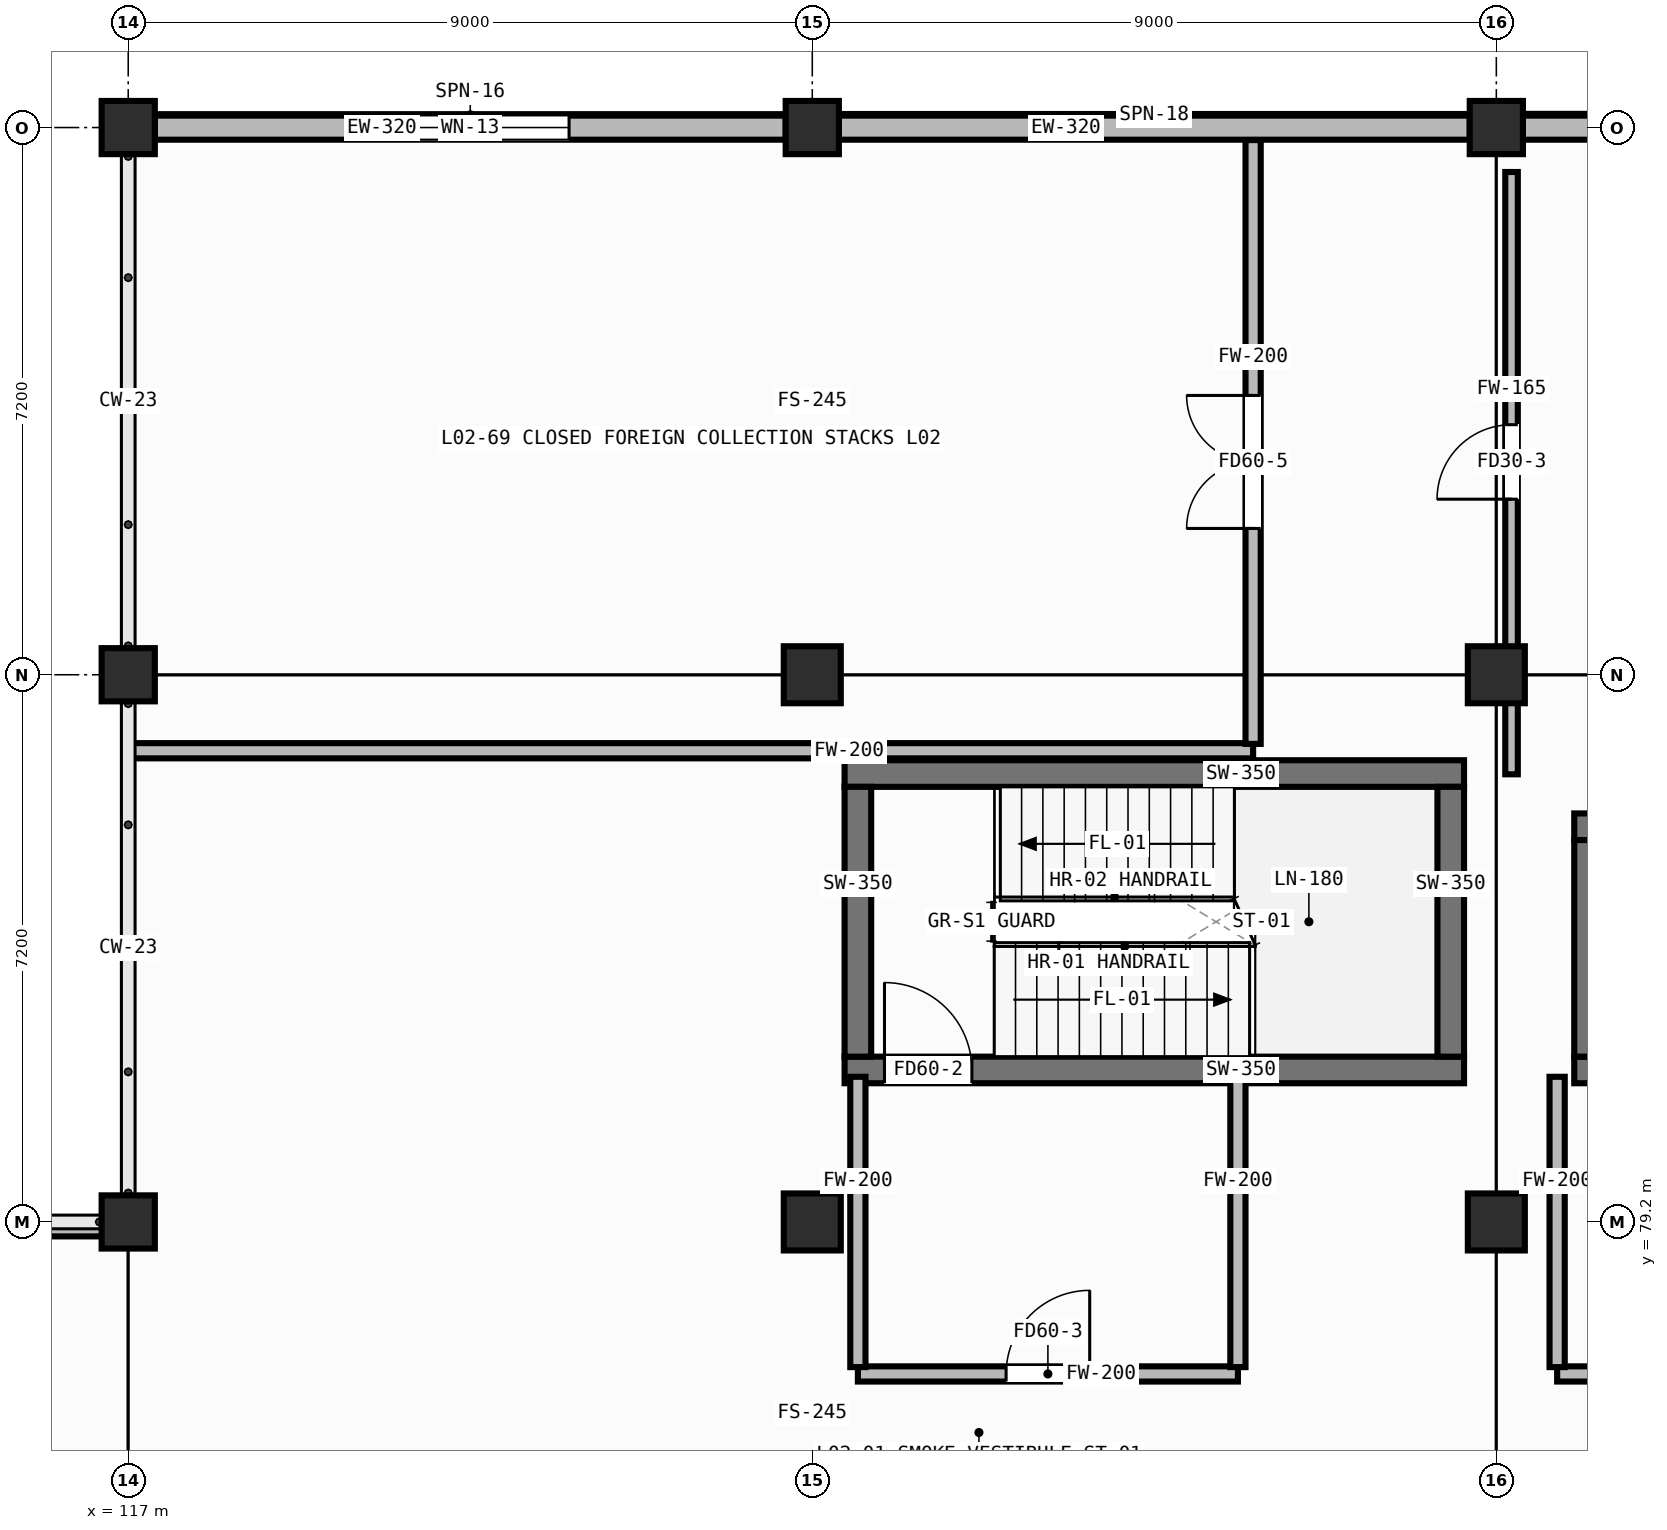
"""IFC4 building model, lengths in metres.
Left out: names, types, materials, properties, quantities, classifications, styles, units other than length and angle.
Written with IfcOpenShell. Run it as: python <this file> out.ifc"""

import sys

from ifc_helpers import new_model, si_unit, direction, frame, frame_2d, origin, origin_2d, place, context, subcontext, project, spatial, rectangle, hollow_rectangle, extrude, element, fill, save


model = new_model("IFC4")
c1 = context("Model", 3, precision=1e-05, world=origin(), true_north=direction((0.0, 1.0)))
c2 = subcontext(c1, "Body", "Model", "MODEL_VIEW")
j1 = project(units=[si_unit("LENGTHUNIT", "METRE"), si_unit("PLANEANGLEUNIT", "RADIAN")], contexts=[c1])
p1 = place(None, origin())
s1 = spatial("IfcSite", under=j1, at=p1, CompositionType="ELEMENT")
p2 = place(p1, origin())
s2 = spatial("IfcBuilding", under=s1, at=p2, CompositionType="ELEMENT")
p3 = place(p2, frame((0.0, 0.0, 4.8)))
s3 = spatial("IfcBuildingStorey", under=s2, at=p3, CompositionType="ELEMENT", Elevation=4.8)
for number, where, z_axis, x_axis in (
    (1, (117.0, 79.2, 0.0), (0.0, 0.0, 1.0), (1.0, 0.0, 0.0)),
    (2, (117.0, 86.4, 0.0), (0.0, 0.0, 1.0), (1.0, 0.0, 0.0)),
    (3, (117.0, 93.6, 0.0), (0.0, 0.0, 1.0), (1.0, 0.0, 0.0)),
):
    element("IfcColumn", number, at=place(p3, frame(where, z_axis=z_axis, x_axis=x_axis)), inside=s3, PredefinedType="COLUMN", context=c2, shape_type="SweptSolid", body=[
        extrude(hollow_rectangle(XDim=0.7, YDim=0.7, WallThickness=0.028, at=origin_2d()), origin(), (0.0, 0.0, 1.0), 4.0),
    ])
for number, where, z_axis, x_axis in (
    (4, (126.0, 79.2, 0.0), (0.0, 0.0, 1.0), (1.0, 0.0, 0.0)),
    (5, (126.0, 86.4, 0.0), (0.0, 0.0, 1.0), (1.0, 0.0, 0.0)),
):
    element("IfcColumn", number, at=place(p3, frame(where, z_axis=z_axis, x_axis=x_axis)), inside=s3, PredefinedType="COLUMN", context=c2, shape_type="SweptSolid", body=[
        extrude(hollow_rectangle(XDim=0.75, YDim=0.75, WallThickness=0.032, at=origin_2d()), origin(), (0.0, 0.0, 1.0), 4.0),
    ])
p4 = place(p3, frame((126.0, 93.6, 0.0), z_axis=(0.0, 0.0, 1.0), x_axis=(1.0, 0.0, 0.0)))
e6 = element("IfcColumn", 6, at=p4, inside=s3, PredefinedType="COLUMN", context=c2, shape_type="SweptSolid", body=[
    extrude(hollow_rectangle(XDim=0.7, YDim=0.7, WallThickness=0.028, at=origin_2d()), origin(), (0.0, 0.0, 1.0), 4.0),
])
for number, where, z_axis, x_axis in (
    (7, (135.0, 79.2, 0.0), (0.0, 0.0, 1.0), (1.0, 0.0, 0.0)),
    (8, (135.0, 86.4, 0.0), (0.0, 0.0, 1.0), (1.0, 0.0, 0.0)),
):
    element("IfcColumn", number, at=place(p3, frame(where, z_axis=z_axis, x_axis=x_axis)), inside=s3, PredefinedType="COLUMN", context=c2, shape_type="SweptSolid", body=[
        extrude(hollow_rectangle(XDim=0.75, YDim=0.75, WallThickness=0.032, at=origin_2d()), origin(), (0.0, 0.0, 1.0), 4.0),
    ])
p5 = place(p3, frame((135.0, 93.6, 0.0), z_axis=(0.0, 0.0, 1.0), x_axis=(1.0, 0.0, 0.0)))
e9 = element("IfcColumn", 9, at=p5, inside=s3, PredefinedType="COLUMN", context=c2, shape_type="SweptSolid", body=[
    extrude(hollow_rectangle(XDim=0.7, YDim=0.7, WallThickness=0.028, at=origin_2d()), origin(), (0.0, 0.0, 1.0), 4.0),
])
p6 = place(p3, frame((125.65, 93.6, 0.0), z_axis=(0.0, 0.0, 1.0), x_axis=(-1.0, 0.0, 0.0)))
e10 = element("IfcWall", 10, at=p6, inside=s3, PredefinedType="STANDARD", context=c2, shape_type="SweptSolid", body=[
    extrude(rectangle(XDim=8.3, YDim=0.32, at=frame_2d((4.15, 0.0))), origin(), (0.0, 0.0, 1.0), 3.255),
])
p7 = place(p6, frame((2.85, 0.0, 0.85)))
e11 = element("IfcOpeningElement", 11, at=p7, cuts=e10, PredefinedType="OPENING", context=c2, shape_type="SweptSolid", body=[
    extrude(rectangle(XDim=2.6, YDim=1.6, at=frame_2d((1.3, 0.8))), frame((0.0, 0.172, 0.0), z_axis=(0.0, -1.0, 0.0), x_axis=(1.0, 0.0, 0.0)), (0.0, 0.0, 1.0), 0.344),
])
p8 = place(p3, frame((134.65, 93.6, 0.0), z_axis=(0.0, 0.0, 1.0), x_axis=(-1.0, 0.0, 0.0)))
e12 = element("IfcWall", 12, at=p8, inside=s3, PredefinedType="STANDARD", context=c2, shape_type="SweptSolid", body=[
    extrude(rectangle(XDim=8.3, YDim=0.32, at=frame_2d((4.15, 0.0))), origin(), (0.0, 0.0, 1.0), 3.255),
])
p9 = place(p3, frame((143.65, 93.6, 0.0), z_axis=(0.0, 0.0, 1.0), x_axis=(-1.0, 0.0, 0.0)))
e13 = element("IfcWall", 13, at=p9, inside=s3, PredefinedType="STANDARD", context=c2, shape_type="SweptSolid", body=[
    extrude(rectangle(XDim=8.3, YDim=0.32, at=frame_2d((4.15, 0.0))), origin(), (0.0, 0.0, 1.0), 3.255),
])
p10 = place(p9, frame((2.85, 0.0, 0.85)))
e14 = element("IfcOpeningElement", 14, at=p10, cuts=e13, PredefinedType="OPENING", context=c2, shape_type="SweptSolid", body=[
    extrude(rectangle(XDim=2.6, YDim=1.6, at=frame_2d((1.3, 0.8))), frame((0.0, 0.172, 0.0), z_axis=(0.0, -1.0, 0.0), x_axis=(1.0, 0.0, 0.0)), (0.0, 0.0, 1.0), 0.344),
])
p11 = place(p3, frame((108.0, 79.105, 4.0), z_axis=(0.0, 0.0, 1.0), x_axis=(1.0, 0.0, 0.0)))
e15 = element("IfcWall", 15, at=p11, inside=s3, PredefinedType="PARAPET", context=c2, shape_type="SweptSolid", body=[
    extrude(rectangle(XDim=9.0, YDim=0.19, at=frame_2d((4.5, 0.0))), origin(), (0.0, 0.0, 1.0), 0.65),
])
p12 = place(p3, frame((126.425, 81.2, 0.0), z_axis=(0.0, 0.0, 1.0), x_axis=(1.0, 0.0, 0.0)))
e16 = element("IfcWall", 16, at=p12, inside=s3, PredefinedType="SHEAR", context=c2, shape_type="SweptSolid", body=[
    extrude(rectangle(XDim=8.15, YDim=0.35, at=frame_2d((4.075, 0.0))), origin(), (0.0, 0.0, 1.0), 3.755),
])
p13 = place(p12, frame((0.525, 0.0, 0.0)))
e17 = element("IfcOpeningElement", 17, at=p13, cuts=e16, PredefinedType="OPENING", context=c2, shape_type="SweptSolid", body=[
    extrude(rectangle(XDim=1.15, YDim=2.1, at=frame_2d((0.575, 1.05))), frame((0.0, 0.187, 0.0), z_axis=(0.0, -1.0, 0.0), x_axis=(1.0, 0.0, 0.0)), (0.0, 0.0, 1.0), 0.374),
])
p14 = place(p3, frame((126.425, 85.1, 0.0), z_axis=(0.0, 0.0, 1.0), x_axis=(1.0, 0.0, 0.0)))
e18 = element("IfcWall", 18, at=p14, inside=s3, PredefinedType="SHEAR", context=c2, shape_type="SweptSolid", body=[
    extrude(rectangle(XDim=8.15, YDim=0.35, at=frame_2d((4.075, 0.0))), origin(), (0.0, 0.0, 1.0), 3.755),
])
for number, where, z_axis, x_axis in (
    (19, (126.6, 81.375, 0.0), (0.0, 0.0, 1.0), (0.0, 1.0, 0.0)),
    (20, (134.4, 81.375, 0.0), (0.0, 0.0, 1.0), (0.0, 1.0, 0.0)),
):
    element("IfcWall", number, at=place(p3, frame(where, z_axis=z_axis, x_axis=x_axis)), inside=s3, PredefinedType="SHEAR", context=c2, shape_type="SweptSolid", body=[
        extrude(rectangle(XDim=3.55, YDim=0.35, at=frame_2d((1.775, 0.0))), origin(), (0.0, 0.0, 1.0), 3.755),
    ])
p15 = place(p3, frame((136.025, 81.2, 0.0), z_axis=(0.0, 0.0, 1.0), x_axis=(1.0, 0.0, 0.0)))
e21 = element("IfcWall", 21, at=p15, inside=s3, PredefinedType="SHEAR", context=c2, shape_type="SweptSolid", body=[
    extrude(rectangle(XDim=2.75, YDim=0.35, at=frame_2d((1.375, 0.0))), origin(), (0.0, 0.0, 1.0), 3.755),
])
p16 = place(p15, frame((0.8, 0.0, 0.0)))
e22 = element("IfcOpeningElement", 22, at=p16, cuts=e21, PredefinedType="OPENING", context=c2, shape_type="SweptSolid", body=[
    extrude(rectangle(XDim=1.15, YDim=2.12, at=frame_2d((0.575, 1.06))), frame((0.0, 0.187, 0.0), z_axis=(0.0, -1.0, 0.0), x_axis=(1.0, 0.0, 0.0)), (0.0, 0.0, 1.0), 0.374),
])
p17 = place(p3, frame((136.025, 84.4, 0.0), z_axis=(0.0, 0.0, 1.0), x_axis=(1.0, 0.0, 0.0)))
e23 = element("IfcWall", 23, at=p17, inside=s3, PredefinedType="SHEAR", context=c2, shape_type="SweptSolid", body=[
    extrude(rectangle(XDim=2.75, YDim=0.35, at=frame_2d((1.375, 0.0))), origin(), (0.0, 0.0, 1.0), 3.755),
])
p18 = place(p3, frame((136.2, 81.375, 0.0), z_axis=(0.0, 0.0, 1.0), x_axis=(0.0, 1.0, 0.0)))
e24 = element("IfcWall", 24, at=p18, inside=s3, PredefinedType="SHEAR", context=c2, shape_type="SweptSolid", body=[
    extrude(rectangle(XDim=2.85, YDim=0.35, at=frame_2d((1.425, 0.0))), origin(), (0.0, 0.0, 1.0), 3.755),
])
p19 = place(p3, frame((126.6, 77.2, 0.0), z_axis=(0.0, 0.0, 1.0), x_axis=(1.0, 0.0, 0.0)))
e25 = element("IfcWall", 25, at=p19, inside=s3, PredefinedType="PARTITIONING", context=c2, shape_type="SweptSolid", body=[
    extrude(rectangle(XDim=5.0, YDim=0.2, at=frame_2d((2.5, 0.0))), origin(), (0.0, 0.0, 1.0), 3.755),
])
p20 = place(p19, frame((1.95, 0.0, 0.0)))
e26 = element("IfcOpeningElement", 26, at=p20, cuts=e25, PredefinedType="OPENING", context=c2, shape_type="SweptSolid", body=[
    extrude(rectangle(XDim=1.1, YDim=2.08, at=frame_2d((0.55, 1.04))), frame((0.0, 0.112, 0.0), z_axis=(0.0, -1.0, 0.0), x_axis=(1.0, 0.0, 0.0)), (0.0, 0.0, 1.0), 0.224),
])
for number, where, z_axis, x_axis in (
    (27, (126.6, 77.29, 0.0), (0.0, 0.0, 1.0), (0.0, 1.0, 0.0)),
    (28, (131.6, 77.29, 0.0), (0.0, 0.0, 1.0), (0.0, 1.0, 0.0)),
):
    element("IfcWall", number, at=place(p3, frame(where, z_axis=z_axis, x_axis=x_axis)), inside=s3, PredefinedType="PARTITIONING", context=c2, shape_type="SweptSolid", body=[
        extrude(rectangle(XDim=3.82, YDim=0.2, at=frame_2d((1.91, 0.0))), origin(), (0.0, 0.0, 1.0), 3.755),
    ])
p21 = place(p3, frame((135.8, 77.2, 0.0), z_axis=(0.0, 0.0, 1.0), x_axis=(1.0, 0.0, 0.0)))
e29 = element("IfcWall", 29, at=p21, inside=s3, PredefinedType="PARTITIONING", context=c2, shape_type="SweptSolid", body=[
    extrude(rectangle(XDim=7.8, YDim=0.2, at=frame_2d((3.9, 0.0))), origin(), (0.0, 0.0, 1.0), 3.755),
])
p22 = place(p21, frame((3.1, 0.0, 0.0)))
e30 = element("IfcOpeningElement", 30, at=p22, cuts=e29, PredefinedType="OPENING", context=c2, shape_type="SweptSolid", body=[
    extrude(rectangle(XDim=1.2, YDim=2.1, at=frame_2d((0.6, 1.05))), frame((0.0, 0.112, 0.0), z_axis=(0.0, -1.0, 0.0), x_axis=(1.0, 0.0, 0.0)), (0.0, 0.0, 1.0), 0.224),
])
p23 = place(p3, frame((135.8, 77.29, 0.0), z_axis=(0.0, 0.0, 1.0), x_axis=(0.0, 1.0, 0.0)))
e31 = element("IfcWall", 31, at=p23, inside=s3, PredefinedType="PARTITIONING", context=c2, shape_type="SweptSolid", body=[
    extrude(rectangle(XDim=3.82, YDim=0.2, at=frame_2d((1.91, 0.0))), origin(), (0.0, 0.0, 1.0), 3.755),
])
p24 = place(p3, frame((117.035, 85.4, 0.0), z_axis=(0.0, 0.0, 1.0), x_axis=(1.0, 0.0, 0.0)))
e32 = element("IfcWall", 32, at=p24, inside=s3, PredefinedType="PARTITIONING", context=c2, shape_type="SweptSolid", body=[
    extrude(rectangle(XDim=14.765, YDim=0.2, at=frame_2d((7.383, 0.0))), origin(), (0.0, 0.0, 1.0), 3.755),
])
p25 = place(p3, frame((131.8, 85.49, 0.0), z_axis=(0.0, 0.0, 1.0), x_axis=(0.0, 1.0, 0.0)))
e33 = element("IfcWall", 33, at=p25, inside=s3, PredefinedType="PARTITIONING", context=c2, shape_type="SweptSolid", body=[
    extrude(rectangle(XDim=7.945, YDim=0.2, at=frame_2d((3.973, 0.0))), origin(), (0.0, 0.0, 1.0), 3.755),
])
p26 = place(p25, frame((2.835, 0.0, 0.0)))
e34 = element("IfcOpeningElement", 34, at=p26, cuts=e33, PredefinedType="OPENING", context=c2, shape_type="SweptSolid", body=[
    extrude(rectangle(XDim=1.75, YDim=2.12, at=frame_2d((0.875, 1.06))), frame((0.0, 0.112, 0.0), z_axis=(0.0, -1.0, 0.0), x_axis=(1.0, 0.0, 0.0)), (0.0, 0.0, 1.0), 0.224),
])
p27 = place(p3, frame((135.2, 85.09, 0.0), z_axis=(0.0, 0.0, 1.0), x_axis=(0.0, 1.0, 0.0)))
e35 = element("IfcWall", 35, at=p27, inside=s3, PredefinedType="PARTITIONING", context=c2, shape_type="SweptSolid", body=[
    extrude(rectangle(XDim=7.925, YDim=0.165, at=frame_2d((3.962, 0.0))), origin(), (0.0, 0.0, 1.0), 3.035),
])
p28 = place(p27, frame((3.62, 0.0, 0.0)))
e36 = element("IfcOpeningElement", 36, at=p28, cuts=e35, PredefinedType="OPENING", context=c2, shape_type="SweptSolid", body=[
    extrude(rectangle(XDim=0.98, YDim=2.02, at=frame_2d((0.49, 1.01))), frame((0.0, 0.094, 0.0), z_axis=(0.0, -1.0, 0.0), x_axis=(1.0, 0.0, 0.0)), (0.0, 0.0, 1.0), 0.189),
])
p29 = place(p7, origin())
e37 = element("IfcWindow", 37, at=p29, inside=s3, PartitioningType="DOUBLE_PANEL_VERTICAL", PredefinedType="WINDOW", context=c2, shape_type="SweptSolid", body=[
    extrude(rectangle(XDim=2.6, YDim=1.6, at=frame_2d((1.3, 0.8))), frame((0.0, 0.03, 0.0), z_axis=(0.0, -1.0, 0.0), x_axis=(1.0, 0.0, 0.0)), (0.0, 0.0, 1.0), 0.06),
])
fill(e11, e37)
p30 = place(p13, origin())
e38 = element("IfcDoor", 38, at=p30, inside=s3, OperationType="SINGLE_SWING_LEFT", PredefinedType="DOOR", context=c2, shape_type="SweptSolid", body=[
    extrude(rectangle(XDim=1.15, YDim=2.1, at=frame_2d((0.575, 1.05))), frame((0.0, 0.025, 0.0), z_axis=(0.0, -1.0, 0.0), x_axis=(1.0, 0.0, 0.0)), (0.0, 0.0, 1.0), 0.05),
])
fill(e17, e38)
p31 = place(p20, origin())
e39 = element("IfcDoor", 39, at=p31, inside=s3, OperationType="SINGLE_SWING_RIGHT", PredefinedType="DOOR", context=c2, shape_type="SweptSolid", body=[
    extrude(rectangle(XDim=1.1, YDim=2.08, at=frame_2d((0.55, 1.04))), frame((0.0, 0.025, 0.0), z_axis=(0.0, -1.0, 0.0), x_axis=(1.0, 0.0, 0.0)), (0.0, 0.0, 1.0), 0.05),
])
fill(e26, e39)
p32 = place(p26, origin())
e40 = element("IfcDoor", 40, at=p32, inside=s3, OperationType="DOUBLE_DOOR_SINGLE_SWING", PredefinedType="DOOR", context=c2, shape_type="SweptSolid", body=[
    extrude(rectangle(XDim=1.75, YDim=2.12, at=frame_2d((0.875, 1.06))), frame((0.0, 0.025, 0.0), z_axis=(0.0, -1.0, 0.0), x_axis=(1.0, 0.0, 0.0)), (0.0, 0.0, 1.0), 0.05),
])
fill(e34, e40)
p33 = place(p28, origin())
e41 = element("IfcDoor", 41, at=p33, inside=s3, OperationType="SINGLE_SWING_LEFT", PredefinedType="DOOR", context=c2, shape_type="SweptSolid", body=[
    extrude(rectangle(XDim=0.98, YDim=2.02, at=frame_2d((0.49, 1.01))), frame((0.0, 0.025, 0.0), z_axis=(0.0, -1.0, 0.0), x_axis=(1.0, 0.0, 0.0)), (0.0, 0.0, 1.0), 0.05),
])
fill(e36, e41)
save(model, sys.argv[1])
